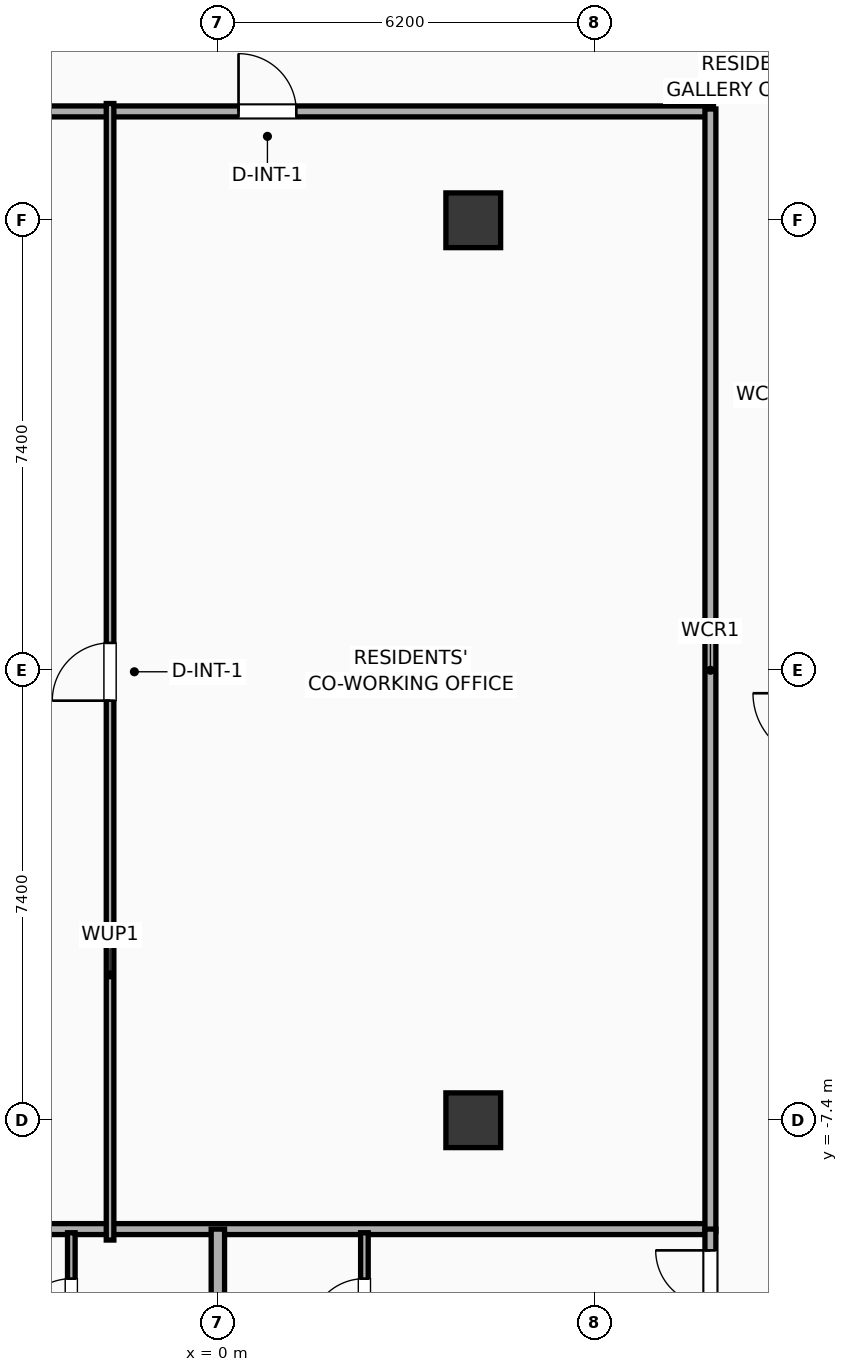
"""IFC4 building model, lengths in metres.
Left out: names, types, materials, properties, quantities, classifications, styles, units other than length and angle.
Written with IfcOpenShell. Run it as: python <this file> out.ifc"""

import sys

from ifc_helpers import new_model, si_unit, direction, frame, frame_2d, origin, origin_2d, place, context, subcontext, project, spatial, rectangle, extrude, element, fill, save


model = new_model("IFC4")
c1 = context("Model", 3, precision=1e-05, world=origin(), true_north=direction((0.0, 1.0)))
c2 = subcontext(c1, "Body", "Model", "MODEL_VIEW")
j1 = project(units=[si_unit("LENGTHUNIT", "METRE"), si_unit("PLANEANGLEUNIT", "RADIAN")], contexts=[c1])
p1 = place(None, origin())
s1 = spatial("IfcSite", under=j1, at=p1, CompositionType="ELEMENT")
p2 = place(p1, origin())
s2 = spatial("IfcBuilding", under=s1, at=p2, CompositionType="ELEMENT")
p3 = place(p2, frame((0.0, 0.0, 283.4)))
s3 = spatial("IfcBuildingStorey", under=s2, at=p3, CompositionType="ELEMENT", Elevation=283.4)
for number, where, z_axis, x_axis in (
    (1, (4.2, -7.4, 0.0), (0.0, 0.0, 1.0), (1.0, 0.0, 0.0)),
    (2, (4.2, 7.4, 0.0), (0.0, 0.0, 1.0), (1.0, 0.0, 0.0)),
):
    element("IfcColumn", number, at=place(p3, frame(where, z_axis=z_axis, x_axis=x_axis)), inside=s3, PredefinedType="COLUMN", context=c2, shape_type="SweptSolid", body=[
        extrude(rectangle(XDim=0.9, YDim=0.9, at=origin_2d()), origin(), (0.0, 0.0, 1.0), 3.9),
    ])
p4 = place(p3, frame((-8.15, 9.19, 0.0), z_axis=(0.0, 0.0, 1.0), x_axis=(1.0, 0.0, 0.0)))
e3 = element("IfcWall", 3, at=p4, inside=s3, PredefinedType="PARTITIONING", context=c2, shape_type="SweptSolid", body=[
    extrude(rectangle(XDim=16.3, YDim=0.18, at=frame_2d((8.15, 0.0))), origin(), (0.0, 0.0, 1.0), 3.65),
])
p5 = place(p4, frame((8.49, 0.0, 0.0)))
e4 = element("IfcOpeningElement", 4, at=p5, cuts=e3, PredefinedType="OPENING", context=c2, shape_type="SweptSolid", body=[
    extrude(rectangle(XDim=0.95, YDim=2.05, at=frame_2d((0.475, 1.025))), frame((0.0, 0.1, 0.0), z_axis=(0.0, -1.0, 0.0), x_axis=(1.0, 0.0, 0.0)), (0.0, 0.0, 1.0), 0.2),
])
p6 = place(p3, frame((-8.15, -9.19, 0.0), z_axis=(0.0, 0.0, 1.0), x_axis=(1.0, 0.0, 0.0)))
e5 = element("IfcWall", 5, at=p6, inside=s3, PredefinedType="PARTITIONING", context=c2, shape_type="SweptSolid", body=[
    extrude(rectangle(XDim=16.3, YDim=0.18, at=frame_2d((8.15, 0.0))), origin(), (0.0, 0.0, 1.0), 3.65),
])
p7 = place(p3, frame((8.1, -9.23, 0.0), z_axis=(0.0, 0.0, 1.0), x_axis=(0.0, 1.0, 0.0)))
e6 = element("IfcWall", 6, at=p7, inside=s3, PredefinedType="PARTITIONING", context=c2, shape_type="SweptSolid", body=[
    extrude(rectangle(XDim=18.46, YDim=0.18, at=frame_2d((9.23, 0.0))), origin(), (0.0, 0.0, 1.0), 3.65),
])
p8 = place(p3, frame((-1.773, -9.37, 0.0), z_axis=(0.0, 0.0, 1.0), x_axis=(0.0, 1.0, 0.0)))
e7 = element("IfcWall", 7, at=p8, inside=s3, PredefinedType="PARTITIONING", context=c2, shape_type="SweptSolid", body=[
    extrude(rectangle(XDim=18.69, YDim=0.125, at=frame_2d((9.345, 0.0))), origin(), (0.0, 0.0, 1.0), 3.65),
])
p9 = place(p8, frame((8.87, 0.0, 0.0)))
e8 = element("IfcOpeningElement", 8, at=p9, cuts=e7, PredefinedType="OPENING", context=c2, shape_type="SweptSolid", body=[
    extrude(rectangle(XDim=0.95, YDim=2.05, at=frame_2d((0.475, 1.025))), frame((0.0, 0.073, 0.0), z_axis=(0.0, -1.0, 0.0), x_axis=(1.0, 0.0, 0.0)), (0.0, 0.0, 1.0), 0.145),
])
p10 = place(p3, frame((-2.41, -11.66, 0.0), z_axis=(0.0, 0.0, 1.0), x_axis=(0.0, 1.0, 0.0)))
e9 = element("IfcWall", 9, at=p10, inside=s3, PredefinedType="PARTITIONING", context=c2, shape_type="SweptSolid", body=[
    extrude(rectangle(XDim=2.41, YDim=0.125, at=frame_2d((1.205, 0.0))), origin(), (0.0, 0.0, 1.0), 3.65),
])
p11 = place(p10, frame((0.755, 0.0, 0.0)))
e10 = element("IfcOpeningElement", 10, at=p11, cuts=e9, PredefinedType="OPENING", context=c2, shape_type="SweptSolid", body=[
    extrude(rectangle(XDim=0.9, YDim=2.05, at=frame_2d((0.45, 1.025))), frame((0.0, 0.073, 0.0), z_axis=(0.0, -1.0, 0.0), x_axis=(1.0, 0.0, 0.0)), (0.0, 0.0, 1.0), 0.145),
])
p12 = place(p3, frame((2.41, -11.66, 0.0), z_axis=(0.0, 0.0, 1.0), x_axis=(0.0, 1.0, 0.0)))
e11 = element("IfcWall", 11, at=p12, inside=s3, PredefinedType="PARTITIONING", context=c2, shape_type="SweptSolid", body=[
    extrude(rectangle(XDim=2.41, YDim=0.125, at=frame_2d((1.205, 0.0))), origin(), (0.0, 0.0, 1.0), 3.65),
])
p13 = place(p12, frame((0.755, 0.0, 0.0)))
e12 = element("IfcOpeningElement", 12, at=p13, cuts=e11, PredefinedType="OPENING", context=c2, shape_type="SweptSolid", body=[
    extrude(rectangle(XDim=0.9, YDim=2.05, at=frame_2d((0.45, 1.025))), frame((0.0, 0.073, 0.0), z_axis=(0.0, -1.0, 0.0), x_axis=(1.0, 0.0, 0.0)), (0.0, 0.0, 1.0), 0.145),
])
p14 = place(p3, frame((8.1, -19.857, 0.0), z_axis=(0.0, 0.0, 1.0), x_axis=(0.0, 1.0, 0.0)))
e13 = element("IfcWall", 13, at=p14, inside=s3, PredefinedType="PARTITIONING", context=c2, shape_type="SweptSolid", body=[
    extrude(rectangle(XDim=10.667, YDim=0.18, at=frame_2d((5.333, 0.0))), origin(), (0.0, 0.0, 1.0), 3.65),
])
p15 = place(p14, frame((9.417, 0.0, 0.0)))
e14 = element("IfcOpeningElement", 14, at=p15, cuts=e13, PredefinedType="OPENING", context=c2, shape_type="SweptSolid", body=[
    extrude(rectangle(XDim=0.9, YDim=2.05, at=frame_2d((0.45, 1.025))), frame((0.0, 0.1, 0.0), z_axis=(0.0, -1.0, 0.0), x_axis=(1.0, 0.0, 0.0)), (0.0, 0.0, 1.0), 0.2),
])
p16 = place(p3, frame((0.0, -19.006, 0.0), z_axis=(0.0, 0.0, 1.0), x_axis=(0.0, 1.0, 0.0)))
e15 = element("IfcWall", 15, at=p16, inside=s3, PredefinedType="PARTITIONING", context=c2, shape_type="SweptSolid", body=[
    extrude(rectangle(XDim=9.816, YDim=0.22, at=frame_2d((4.908, 0.0))), origin(), (0.0, 0.0, 1.0), 3.65),
])
p17 = place(p5, origin())
e16 = element("IfcDoor", 16, at=p17, inside=s3, OperationType="SINGLE_SWING_LEFT", PredefinedType="DOOR", context=c2, shape_type="SweptSolid", body=[
    extrude(rectangle(XDim=0.95, YDim=2.05, at=frame_2d((0.475, 1.025))), frame((0.0, 0.025, 0.0), z_axis=(0.0, -1.0, 0.0), x_axis=(1.0, 0.0, 0.0)), (0.0, 0.0, 1.0), 0.05),
])
fill(e4, e16)
p18 = place(p9, origin())
e17 = element("IfcDoor", 17, at=p18, inside=s3, OperationType="SINGLE_SWING_LEFT", PredefinedType="DOOR", context=c2, shape_type="SweptSolid", body=[
    extrude(rectangle(XDim=0.95, YDim=2.05, at=frame_2d((0.475, 1.025))), frame((0.0, 0.025, 0.0), z_axis=(0.0, -1.0, 0.0), x_axis=(1.0, 0.0, 0.0)), (0.0, 0.0, 1.0), 0.05),
])
fill(e8, e17)
p19 = place(p11, origin())
e18 = element("IfcDoor", 18, at=p19, inside=s3, OperationType="SINGLE_SWING_LEFT", PredefinedType="DOOR", context=c2, shape_type="SweptSolid", body=[
    extrude(rectangle(XDim=0.9, YDim=2.05, at=frame_2d((0.45, 1.025))), frame((0.0, 0.025, 0.0), z_axis=(0.0, -1.0, 0.0), x_axis=(1.0, 0.0, 0.0)), (0.0, 0.0, 1.0), 0.05),
])
fill(e10, e18)
p20 = place(p13, origin())
e19 = element("IfcDoor", 19, at=p20, inside=s3, OperationType="SINGLE_SWING_LEFT", PredefinedType="DOOR", context=c2, shape_type="SweptSolid", body=[
    extrude(rectangle(XDim=0.9, YDim=2.05, at=frame_2d((0.45, 1.025))), frame((0.0, 0.025, 0.0), z_axis=(0.0, -1.0, 0.0), x_axis=(1.0, 0.0, 0.0)), (0.0, 0.0, 1.0), 0.05),
])
fill(e12, e19)
p21 = place(p15, origin())
e20 = element("IfcDoor", 20, at=p21, inside=s3, OperationType="SINGLE_SWING_RIGHT", PredefinedType="DOOR", context=c2, shape_type="SweptSolid", body=[
    extrude(rectangle(XDim=0.9, YDim=2.05, at=frame_2d((0.45, 1.025))), frame((0.0, 0.025, 0.0), z_axis=(0.0, -1.0, 0.0), x_axis=(1.0, 0.0, 0.0)), (0.0, 0.0, 1.0), 0.05),
])
fill(e14, e20)
save(model, sys.argv[1])
